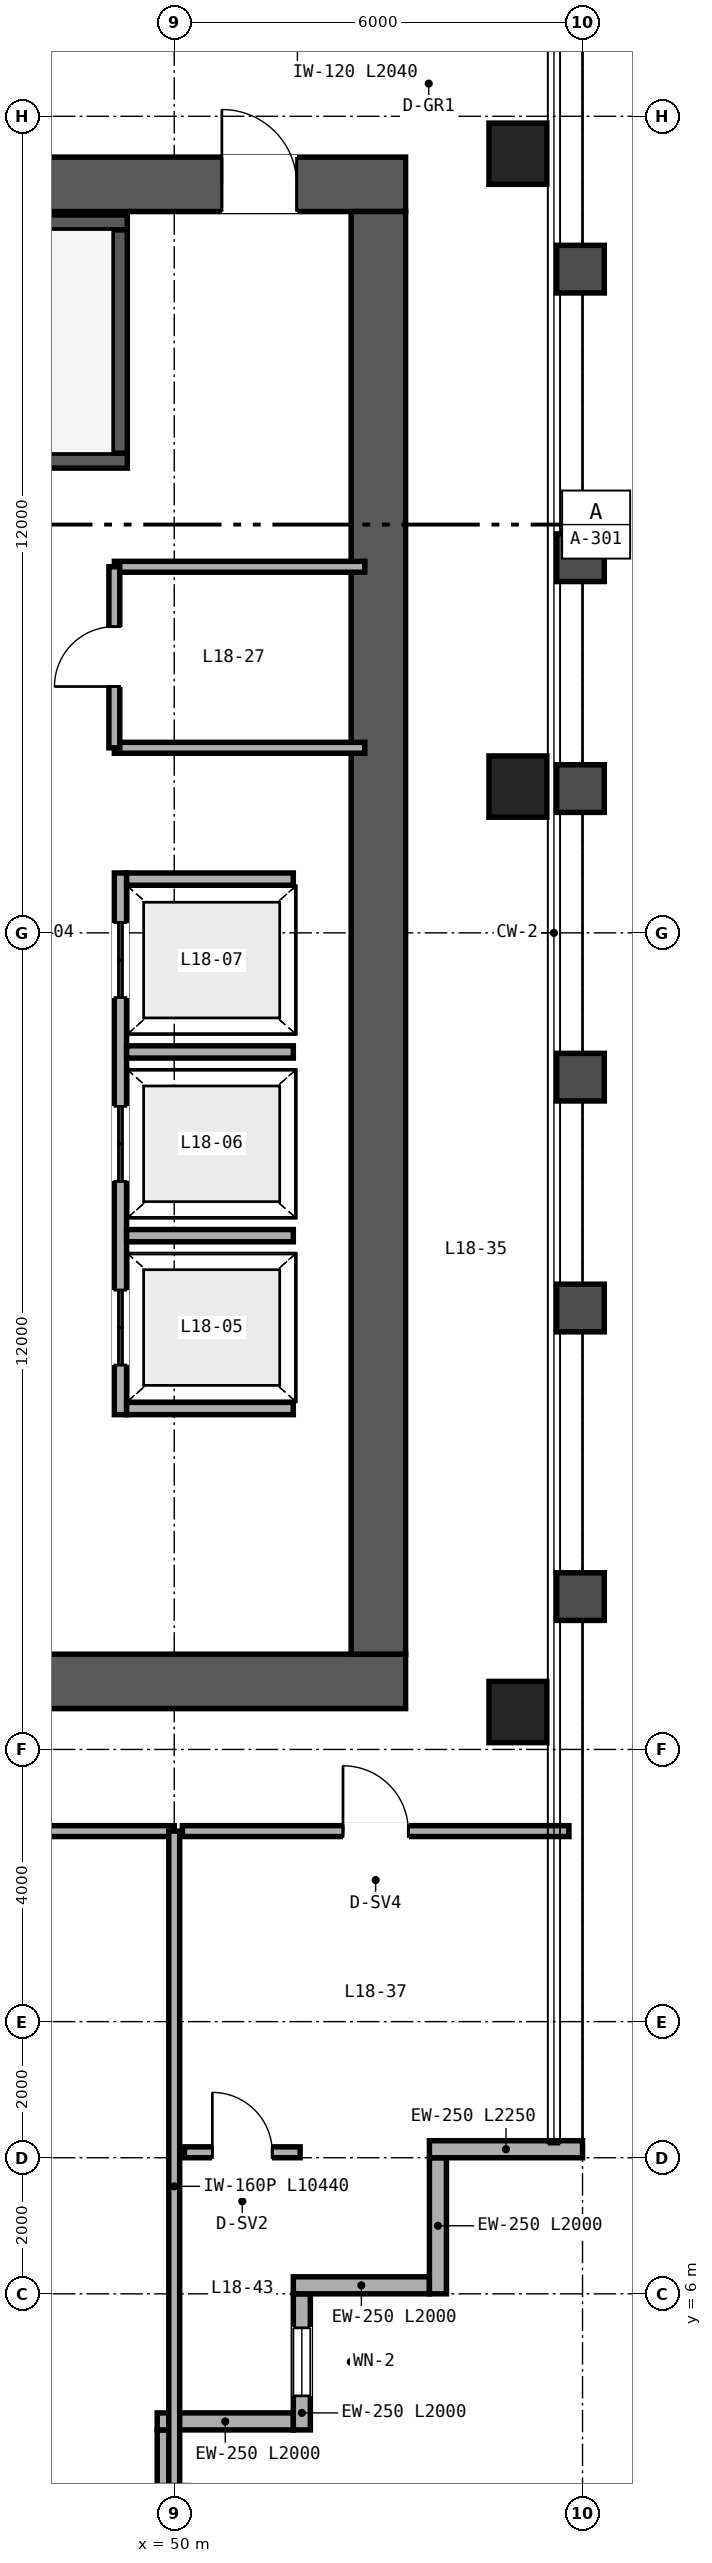
"""IFC4 building model, lengths in metres.
Left out: names, types, materials, properties, quantities, classifications, styles, units other than length and angle.
Written with IfcOpenShell. Run it as: python <this file> out.ifc"""

import sys

from ifc_helpers import new_model, si_unit, direction, frame, frame_2d, origin, origin_2d, place, context, subcontext, project, spatial, rectangle, hollow_rectangle, extrude, source, transform, mapped, element, fill, save


model = new_model("IFC4")
c1 = context("Model", 3, precision=1e-05, world=origin(), true_north=direction((0.0, 1.0)))
c2 = subcontext(c1, "Body", "Model", "MODEL_VIEW")
j1 = project(units=[si_unit("LENGTHUNIT", "METRE"), si_unit("PLANEANGLEUNIT", "RADIAN")], contexts=[c1])
p1 = place(None, origin())
s1 = spatial("IfcSite", under=j1, at=p1, CompositionType="ELEMENT")
p2 = place(p1, origin())
s2 = spatial("IfcBuilding", under=s1, at=p2, CompositionType="ELEMENT")
p3 = place(p2, frame((0.0, 0.0, 74.4)))
s3 = spatial("IfcBuildingStorey", under=s2, at=p3, CompositionType="ELEMENT", Elevation=74.4)
p4 = place(p3, frame((40.6, 15.0, 0.0), z_axis=(0.0, 0.0, 1.0), x_axis=(1.0, 0.0, 0.0)))
e1 = element("IfcWall", 1, at=p4, inside=s3, PredefinedType="SHEAR", context=c2, shape_type="SweptSolid", body=[
    extrude(rectangle(XDim=12.8, YDim=0.8, at=frame_2d((6.4, 0.0))), origin(), (0.0, 0.0, 1.0), 3.35),
])
p5 = place(p4, frame((4.5, 0.0, 0.0)))
e2 = element("IfcOpeningElement", 2, at=p5, cuts=e1, PredefinedType="OPENING", context=c2, shape_type="SweptSolid", body=[
    extrude(rectangle(XDim=1.0, YDim=2.15, at=frame_2d((0.5, 1.075))), frame((0.0, 0.41, 0.0), z_axis=(0.0, -1.0, 0.0), x_axis=(1.0, 0.0, 0.0)), (0.0, 0.0, 1.0), 0.82),
])
p6 = place(p3, frame((40.6, 37.0, 0.0), z_axis=(0.0, 0.0, 1.0), x_axis=(1.0, 0.0, 0.0)))
e3 = element("IfcWall", 3, at=p6, inside=s3, PredefinedType="SHEAR", context=c2, shape_type="SweptSolid", body=[
    extrude(rectangle(XDim=12.8, YDim=0.8, at=frame_2d((6.4, 0.0))), origin(), (0.0, 0.0, 1.0), 3.35),
])
p7 = place(p6, frame((10.1, 0.0, 0.0)))
e4 = element("IfcOpeningElement", 4, at=p7, cuts=e3, PredefinedType="OPENING", context=c2, shape_type="SweptSolid", body=[
    extrude(rectangle(XDim=1.1, YDim=2.15, at=frame_2d((0.55, 1.075))), frame((0.0, 0.41, 0.0), z_axis=(0.0, -1.0, 0.0), x_axis=(1.0, 0.0, 0.0)), (0.0, 0.0, 1.0), 0.82),
])
p8 = place(p3, frame((53.0, 15.4, 0.0), z_axis=(0.0, 0.0, 1.0), x_axis=(0.0, 1.0, 0.0)))
e5 = element("IfcWall", 5, at=p8, inside=s3, PredefinedType="SHEAR", context=c2, shape_type="SweptSolid", body=[
    extrude(rectangle(XDim=21.2, YDim=0.8, at=frame_2d((10.6, 0.0))), origin(), (0.0, 0.0, 1.0), 3.35),
])
p9 = place(p3, frame((41.4, 32.94, 0.0), z_axis=(0.0, 0.0, 1.0), x_axis=(1.0, 0.0, 0.0)))
e6 = element("IfcWall", 6, at=p9, inside=s3, PredefinedType="SHEAR", context=c2, shape_type="SweptSolid", body=[
    extrude(rectangle(XDim=7.91, YDim=0.22, at=frame_2d((3.955, 0.0))), origin(), (0.0, 0.0, 1.0), 3.4),
])
p10 = place(p9, frame((0.52, 0.0, 0.0)))
e7 = element("IfcOpeningElement", 7, at=p10, cuts=e6, PredefinedType="OPENING", context=c2, shape_type="SweptSolid", body=[
    extrude(rectangle(XDim=1.05, YDim=2.15, at=frame_2d((0.525, 1.075))), frame((0.0, 0.12, 0.0), z_axis=(0.0, -1.0, 0.0), x_axis=(1.0, 0.0, 0.0)), (0.0, 0.0, 1.0), 0.24),
])
p11 = place(p3, frame((41.4, 36.44, 0.0), z_axis=(0.0, 0.0, 1.0), x_axis=(1.0, 0.0, 0.0)))
e8 = element("IfcWall", 8, at=p11, inside=s3, PredefinedType="SHEAR", context=c2, shape_type="SweptSolid", body=[
    extrude(rectangle(XDim=7.91, YDim=0.22, at=frame_2d((3.955, 0.0))), origin(), (0.0, 0.0, 1.0), 3.4),
])
p12 = place(p3, frame((49.2, 33.05, 0.0), z_axis=(0.0, 0.0, 1.0), x_axis=(0.0, 1.0, 0.0)))
e9 = element("IfcWall", 9, at=p12, inside=s3, PredefinedType="SHEAR", context=c2, shape_type="SweptSolid", body=[
    extrude(rectangle(XDim=3.28, YDim=0.22, at=frame_2d((1.64, 0.0))), origin(), (0.0, 0.0, 1.0), 3.4),
])
m1 = source(origin(), c2, "Body", "SweptSolid", [
    extrude(hollow_rectangle(XDim=0.85, YDim=0.9, WallThickness=0.04, at=origin_2d()), origin(), (0.0, 0.0, 1.0), 3.35),
])
for number, where, z_axis, x_axis in (
    (10, (55.05, 14.55, 0.0), (0.0, 0.0, 1.0), (1.0, 0.0, 0.0)),
    (11, (55.05, 28.15, 0.0), (0.0, 0.0, 1.0), (1.0, 0.0, 0.0)),
    (12, (55.05, 37.45, 0.0), (0.0, 0.0, 1.0), (1.0, 0.0, 0.0)),
):
    element("IfcColumn", number, at=place(p3, frame(where, z_axis=z_axis, x_axis=x_axis)), inside=s3, PredefinedType="COLUMN", context=c2, shape_type="MappedRepresentation", body=[
        mapped(m1, transform((0.0, 0.0, 0.0), scale=1.0)),
    ])
p13 = place(p3, frame((49.875, 2.0, 0.0), z_axis=(0.0, 0.0, 1.0), x_axis=(0.0, 1.0, 0.0)))
e13 = element("IfcWall", 13, at=p13, inside=s3, PredefinedType="SOLIDWALL", context=c2, shape_type="SweptSolid", body=[
    extrude(rectangle(XDim=2.0, YDim=0.25, at=frame_2d((1.0, 0.0))), origin(), (0.0, 0.0, 1.0), 2.657),
])
p14 = place(p3, frame((49.75, 4.125, 0.0), z_axis=(0.0, 0.0, 1.0), x_axis=(1.0, 0.0, 0.0)))
e14 = element("IfcWall", 14, at=p14, inside=s3, PredefinedType="SOLIDWALL", context=c2, shape_type="SweptSolid", body=[
    extrude(rectangle(XDim=2.0, YDim=0.25, at=frame_2d((1.0, 0.0))), origin(), (0.0, 0.0, 1.0), 3.35),
])
p15 = place(p3, frame((51.875, 4.0, 0.0), z_axis=(0.0, 0.0, 1.0), x_axis=(0.0, 1.0, 0.0)))
e15 = element("IfcWall", 15, at=p15, inside=s3, PredefinedType="SOLIDWALL", context=c2, shape_type="SweptSolid", body=[
    extrude(rectangle(XDim=2.0, YDim=0.25, at=frame_2d((1.0, 0.0))), origin(), (0.0, 0.0, 1.0), 3.35),
])
p16 = place(p15, frame((0.5, 0.0, 0.85)))
e16 = element("IfcOpeningElement", 16, at=p16, cuts=e15, PredefinedType="OPENING", context=c2, shape_type="SweptSolid", body=[
    extrude(rectangle(XDim=1.0, YDim=1.9, at=frame_2d((0.5, 0.95))), frame((0.0, 0.135, 0.0), z_axis=(0.0, -1.0, 0.0), x_axis=(1.0, 0.0, 0.0)), (0.0, 0.0, 1.0), 0.27),
])
for number, where, z_axis, x_axis in (
    (17, (51.75, 6.125, 0.0), (0.0, 0.0, 1.0), (1.0, 0.0, 0.0)),
    (18, (53.875, 6.0, 0.0), (0.0, 0.0, 1.0), (0.0, 1.0, 0.0)),
):
    element("IfcWall", number, at=place(p3, frame(where, z_axis=z_axis, x_axis=x_axis)), inside=s3, PredefinedType="SOLIDWALL", context=c2, shape_type="SweptSolid", body=[
        extrude(rectangle(XDim=2.0, YDim=0.25, at=frame_2d((1.0, 0.0))), origin(), (0.0, 0.0, 1.0), 3.35),
    ])
p17 = place(p3, frame((53.75, 8.125, 0.0), z_axis=(0.0, 0.0, 1.0), x_axis=(1.0, 0.0, 0.0)))
e19 = element("IfcWall", 19, at=p17, inside=s3, PredefinedType="SOLIDWALL", context=c2, shape_type="SweptSolid", body=[
    extrude(rectangle(XDim=2.25, YDim=0.25, at=frame_2d((1.125, 0.0))), origin(), (0.0, 0.0, 1.0), 3.35),
])
p18 = place(p3, frame((49.21, 18.92, 0.0), z_axis=(0.0, 0.0, 1.0), x_axis=(0.0, 1.0, 0.0)))
e20 = element("IfcWall", 20, at=p18, inside=s3, PredefinedType="SOLIDWALL", context=c2, shape_type="SweptSolid", body=[
    extrude(rectangle(XDim=7.96, YDim=0.18, at=frame_2d((3.98, 0.0))), origin(), (0.0, 0.0, 1.0), 3.35),
])
p19 = place(p18, frame((0.73, 0.0, 0.0)))
e21 = element("IfcOpeningElement", 21, at=p19, cuts=e20, PredefinedType="OPENING", context=c2, shape_type="SweptSolid", body=[
    extrude(rectangle(XDim=1.1, YDim=2.2, at=frame_2d((0.55, 1.1))), frame((0.0, 0.1, 0.0), z_axis=(0.0, -1.0, 0.0), x_axis=(1.0, 0.0, 0.0)), (0.0, 0.0, 1.0), 0.2),
])
p20 = place(p18, frame((3.43, 0.0, 0.0)))
e22 = element("IfcOpeningElement", 22, at=p20, cuts=e20, PredefinedType="OPENING", context=c2, shape_type="SweptSolid", body=[
    extrude(rectangle(XDim=1.1, YDim=2.2, at=frame_2d((0.55, 1.1))), frame((0.0, 0.1, 0.0), z_axis=(0.0, -1.0, 0.0), x_axis=(1.0, 0.0, 0.0)), (0.0, 0.0, 1.0), 0.2),
])
p21 = place(p18, frame((6.13, 0.0, 0.0)))
e23 = element("IfcOpeningElement", 23, at=p21, cuts=e20, PredefinedType="OPENING", context=c2, shape_type="SweptSolid", body=[
    extrude(rectangle(XDim=1.1, YDim=2.2, at=frame_2d((0.55, 1.1))), frame((0.0, 0.1, 0.0), z_axis=(0.0, -1.0, 0.0), x_axis=(1.0, 0.0, 0.0)), (0.0, 0.0, 1.0), 0.2),
])
for number, where, z_axis, x_axis in (
    (24, (49.3, 19.01, 0.0), (0.0, 0.0, 1.0), (1.0, 0.0, 0.0)),
    (25, (49.3, 26.79, 0.0), (0.0, 0.0, 1.0), (1.0, 0.0, 0.0)),
    (26, (49.3, 21.55, 0.0), (0.0, 0.0, 1.0), (1.0, 0.0, 0.0)),
    (27, (49.3, 24.25, 0.0), (0.0, 0.0, 1.0), (1.0, 0.0, 0.0)),
):
    element("IfcWall", number, at=place(p3, frame(where, z_axis=z_axis, x_axis=x_axis)), inside=s3, PredefinedType="SOLIDWALL", context=c2, shape_type="SweptSolid", body=[
        extrude(rectangle(XDim=2.45, YDim=0.18, at=frame_2d((1.225, 0.0))), origin(), (0.0, 0.0, 1.0), 3.35),
    ])
p22 = place(p3, frame((49.12, 28.72, 0.0), z_axis=(0.0, 0.0, 1.0), x_axis=(1.0, 0.0, 0.0)))
e28 = element("IfcWall", 28, at=p22, inside=s3, PredefinedType="PARTITIONING", context=c2, shape_type="SweptSolid", body=[
    extrude(rectangle(XDim=3.68, YDim=0.16, at=frame_2d((1.84, 0.0))), origin(), (0.0, 0.0, 1.0), 3.35),
])
p23 = place(p3, frame((49.12, 31.38, 0.0), z_axis=(0.0, 0.0, 1.0), x_axis=(1.0, 0.0, 0.0)))
e29 = element("IfcWall", 29, at=p23, inside=s3, PredefinedType="PARTITIONING", context=c2, shape_type="SweptSolid", body=[
    extrude(rectangle(XDim=3.68, YDim=0.16, at=frame_2d((1.84, 0.0))), origin(), (0.0, 0.0, 1.0), 2.36),
])
p24 = place(p3, frame((49.12, 28.72, 0.0), z_axis=(0.0, 0.0, 1.0), x_axis=(0.0, 1.0, 0.0)))
e30 = element("IfcWall", 30, at=p24, inside=s3, PredefinedType="PARTITIONING", context=c2, shape_type="SweptSolid", body=[
    extrude(rectangle(XDim=2.66, YDim=0.16, at=frame_2d((1.33, 0.0))), origin(), (0.0, 0.0, 1.0), 2.36),
])
p25 = place(p24, frame((0.9, 0.0, 0.0)))
e31 = element("IfcOpeningElement", 31, at=p25, cuts=e30, PredefinedType="OPENING", context=c2, shape_type="SweptSolid", body=[
    extrude(rectangle(XDim=0.88, YDim=2.15, at=frame_2d((0.44, 1.075))), frame((0.0, 0.09, 0.0), z_axis=(0.0, -1.0, 0.0), x_axis=(1.0, 0.0, 0.0)), (0.0, 0.0, 1.0), 0.18),
])
p26 = place(p3, frame((50.12, 12.8, 0.0), z_axis=(0.0, 0.0, 1.0), x_axis=(1.0, 0.0, 0.0)))
e32 = element("IfcWall", 32, at=p26, inside=s3, PredefinedType="PARTITIONING", context=c2, shape_type="SweptSolid", body=[
    extrude(rectangle(XDim=5.68, YDim=0.16, at=frame_2d((2.84, 0.0))), origin(), (0.0, 0.0, 1.0), 3.35),
])
p27 = place(p26, frame((2.36, 0.0, 0.0)))
e33 = element("IfcOpeningElement", 33, at=p27, cuts=e32, PredefinedType="OPENING", context=c2, shape_type="SweptSolid", body=[
    extrude(rectangle(XDim=0.96, YDim=2.15, at=frame_2d((0.48, 1.075))), frame((0.0, 0.09, 0.0), z_axis=(0.0, -1.0, 0.0), x_axis=(1.0, 0.0, 0.0)), (0.0, 0.0, 1.0), 0.18),
])
p28 = place(p3, frame((50.15, 8.08, 0.0), z_axis=(0.0, 0.0, 1.0), x_axis=(1.0, 0.0, 0.0)))
e34 = element("IfcWall", 34, at=p28, inside=s3, PredefinedType="PARTITIONING", context=c2, shape_type="SweptSolid", body=[
    extrude(rectangle(XDim=1.7, YDim=0.16, at=frame_2d((0.85, 0.0))), origin(), (0.0, 0.0, 1.0), 3.35),
])
p29 = place(p28, frame((0.41, 0.0, 0.0)))
e35 = element("IfcOpeningElement", 35, at=p29, cuts=e34, PredefinedType="OPENING", context=c2, shape_type="SweptSolid", body=[
    extrude(rectangle(XDim=0.88, YDim=2.15, at=frame_2d((0.44, 1.075))), frame((0.0, 0.09, 0.0), z_axis=(0.0, -1.0, 0.0), x_axis=(1.0, 0.0, 0.0)), (0.0, 0.0, 1.0), 0.18),
])
p30 = place(p3, frame((14.0, 12.8, 0.0), z_axis=(0.0, 0.0, 1.0), x_axis=(1.0, 0.0, 0.0)))
e36 = element("IfcWall", 36, at=p30, inside=s3, PredefinedType="PARTITIONING", context=c2, shape_type="SweptSolid", body=[
    extrude(rectangle(XDim=36.0, YDim=0.16, at=frame_2d((18.0, 0.0))), origin(), (0.0, 0.0, 1.0), 2.571),
])
p31 = place(p30, frame((3.54, 0.0, 0.0)))
e37 = element("IfcOpeningElement", 37, at=p31, cuts=e36, PredefinedType="OPENING", context=c2, shape_type="SweptSolid", body=[
    extrude(rectangle(XDim=0.94, YDim=2.15, at=frame_2d((0.47, 1.075))), frame((0.0, 0.09, 0.0), z_axis=(0.0, -1.0, 0.0), x_axis=(1.0, 0.0, 0.0)), (0.0, 0.0, 1.0), 0.18),
])
p32 = place(p30, frame((7.86, 0.0, 0.0)))
e38 = element("IfcOpeningElement", 38, at=p32, cuts=e36, PredefinedType="OPENING", context=c2, shape_type="SweptSolid", body=[
    extrude(rectangle(XDim=0.94, YDim=2.15, at=frame_2d((0.47, 1.075))), frame((0.0, 0.09, 0.0), z_axis=(0.0, -1.0, 0.0), x_axis=(1.0, 0.0, 0.0)), (0.0, 0.0, 1.0), 0.18),
])
p33 = place(p30, frame((11.92, 0.0, 0.0)))
e39 = element("IfcOpeningElement", 39, at=p33, cuts=e36, PredefinedType="OPENING", context=c2, shape_type="SweptSolid", body=[
    extrude(rectangle(XDim=0.96, YDim=2.15, at=frame_2d((0.48, 1.075))), frame((0.0, 0.09, 0.0), z_axis=(0.0, -1.0, 0.0), x_axis=(1.0, 0.0, 0.0)), (0.0, 0.0, 1.0), 0.18),
])
p34 = place(p30, frame((17.52, 0.0, 0.0)))
e40 = element("IfcOpeningElement", 40, at=p34, cuts=e36, PredefinedType="OPENING", context=c2, shape_type="SweptSolid", body=[
    extrude(rectangle(XDim=0.96, YDim=2.15, at=frame_2d((0.48, 1.075))), frame((0.0, 0.09, 0.0), z_axis=(0.0, -1.0, 0.0), x_axis=(1.0, 0.0, 0.0)), (0.0, 0.0, 1.0), 0.18),
])
p35 = place(p30, frame((24.74, 0.0, 0.0)))
e41 = element("IfcOpeningElement", 41, at=p35, cuts=e36, PredefinedType="OPENING", context=c2, shape_type="SweptSolid", body=[
    extrude(rectangle(XDim=0.94, YDim=2.15, at=frame_2d((0.47, 1.075))), frame((0.0, 0.09, 0.0), z_axis=(0.0, -1.0, 0.0), x_axis=(1.0, 0.0, 0.0)), (0.0, 0.0, 1.0), 0.18),
])
p36 = place(p30, frame((29.74, 0.0, 0.0)))
e42 = element("IfcOpeningElement", 42, at=p36, cuts=e36, PredefinedType="OPENING", context=c2, shape_type="SweptSolid", body=[
    extrude(rectangle(XDim=0.94, YDim=2.15, at=frame_2d((0.47, 1.075))), frame((0.0, 0.09, 0.0), z_axis=(0.0, -1.0, 0.0), x_axis=(1.0, 0.0, 0.0)), (0.0, 0.0, 1.0), 0.18),
])
p37 = place(p30, frame((33.02, 0.0, 0.0)))
e43 = element("IfcOpeningElement", 43, at=p37, cuts=e36, PredefinedType="OPENING", context=c2, shape_type="SweptSolid", body=[
    extrude(rectangle(XDim=0.96, YDim=2.15, at=frame_2d((0.48, 1.075))), frame((0.0, 0.09, 0.0), z_axis=(0.0, -1.0, 0.0), x_axis=(1.0, 0.0, 0.0)), (0.0, 0.0, 1.0), 0.18),
])
p38 = place(p3, frame((50.0, 2.36, 0.0), z_axis=(0.0, 0.0, 1.0), x_axis=(0.0, 1.0, 0.0)))
e44 = element("IfcWall", 44, at=p38, inside=s3, PredefinedType="PARTITIONING", context=c2, shape_type="SweptSolid", body=[
    extrude(rectangle(XDim=10.44, YDim=0.16, at=frame_2d((5.22, 0.0))), origin(), (0.0, 0.0, 1.0), 2.657),
])
m2 = source(origin(), c2, "Body", "SweptSolid", [
    extrude(rectangle(XDim=1.0, YDim=1.9, at=frame_2d((0.5, 0.95))), frame((0.0, 0.03, 0.0), z_axis=(0.0, -1.0, 0.0), x_axis=(1.0, 0.0, 0.0)), (0.0, 0.0, 1.0), 0.06),
])
p39 = place(p16, origin())
e45 = element("IfcWindow", 45, at=p39, inside=s3, PartitioningType="SINGLE_PANEL", PredefinedType="WINDOW", context=c2, shape_type="MappedRepresentation", body=[
    mapped(m2, transform((0.0, 0.0, 0.0), scale=1.0)),
])
fill(e16, e45)
m3 = source(origin(), c2, "Body", "SweptSolid", [
    extrude(rectangle(XDim=1.1, YDim=2.2, at=frame_2d((0.55, 1.1))), frame((0.0, 0.025, 0.0), z_axis=(0.0, -1.0, 0.0), x_axis=(1.0, 0.0, 0.0)), (0.0, 0.0, 1.0), 0.05),
])
p40 = place(p19, origin())
e46 = element("IfcDoor", 46, at=p40, inside=s3, OperationType="DOUBLE_DOOR_SLIDING", PredefinedType="DOOR", context=c2, shape_type="MappedRepresentation", body=[
    mapped(m3, transform((0.0, 0.0, 0.0), scale=1.0)),
])
fill(e21, e46)
p41 = place(p20, origin())
e47 = element("IfcDoor", 47, at=p41, inside=s3, OperationType="DOUBLE_DOOR_SLIDING", PredefinedType="DOOR", context=c2, shape_type="MappedRepresentation", body=[
    mapped(m3, transform((0.0, 0.0, 0.0), scale=1.0)),
])
fill(e22, e47)
p42 = place(p21, origin())
e48 = element("IfcDoor", 48, at=p42, inside=s3, OperationType="DOUBLE_DOOR_SLIDING", PredefinedType="DOOR", context=c2, shape_type="MappedRepresentation", body=[
    mapped(m3, transform((0.0, 0.0, 0.0), scale=1.0)),
])
fill(e23, e48)
m4 = source(origin(), c2, "Body", "SweptSolid", [
    extrude(rectangle(XDim=1.1, YDim=2.15, at=frame_2d((0.55, 1.075))), frame((0.0, 0.025, 0.0), z_axis=(0.0, -1.0, 0.0), x_axis=(1.0, 0.0, 0.0)), (0.0, 0.0, 1.0), 0.05),
])
p43 = place(p7, origin())
e49 = element("IfcDoor", 49, at=p43, inside=s3, OperationType="SINGLE_SWING_LEFT", PredefinedType="DOOR", context=c2, shape_type="MappedRepresentation", body=[
    mapped(m4, transform((0.0, 0.0, 0.0), scale=1.0)),
])
fill(e4, e49)
m5 = source(origin(), c2, "Body", "SweptSolid", [
    extrude(rectangle(XDim=0.88, YDim=2.15, at=frame_2d((0.44, 1.075))), frame((0.0, 0.025, 0.0), z_axis=(0.0, -1.0, 0.0), x_axis=(1.0, 0.0, 0.0)), (0.0, 0.0, 1.0), 0.05),
])
p44 = place(p25, origin())
e50 = element("IfcDoor", 50, at=p44, inside=s3, OperationType="SINGLE_SWING_LEFT", PredefinedType="DOOR", context=c2, shape_type="MappedRepresentation", body=[
    mapped(m5, transform((0.0, 0.0, 0.0), scale=1.0)),
])
fill(e31, e50)
m6 = source(origin(), c2, "Body", "SweptSolid", [
    extrude(rectangle(XDim=0.96, YDim=2.15, at=frame_2d((0.48, 1.075))), frame((0.0, 0.025, 0.0), z_axis=(0.0, -1.0, 0.0), x_axis=(1.0, 0.0, 0.0)), (0.0, 0.0, 1.0), 0.05),
])
p45 = place(p27, origin())
e51 = element("IfcDoor", 51, at=p45, inside=s3, OperationType="SINGLE_SWING_LEFT", PredefinedType="DOOR", context=c2, shape_type="MappedRepresentation", body=[
    mapped(m6, transform((0.0, 0.0, 0.0), scale=1.0)),
])
fill(e33, e51)
p46 = place(p29, origin())
e52 = element("IfcDoor", 52, at=p46, inside=s3, OperationType="SINGLE_SWING_LEFT", PredefinedType="DOOR", context=c2, shape_type="MappedRepresentation", body=[
    mapped(m5, transform((0.0, 0.0, 0.0), scale=1.0)),
])
fill(e35, e52)
save(model, sys.argv[1])
